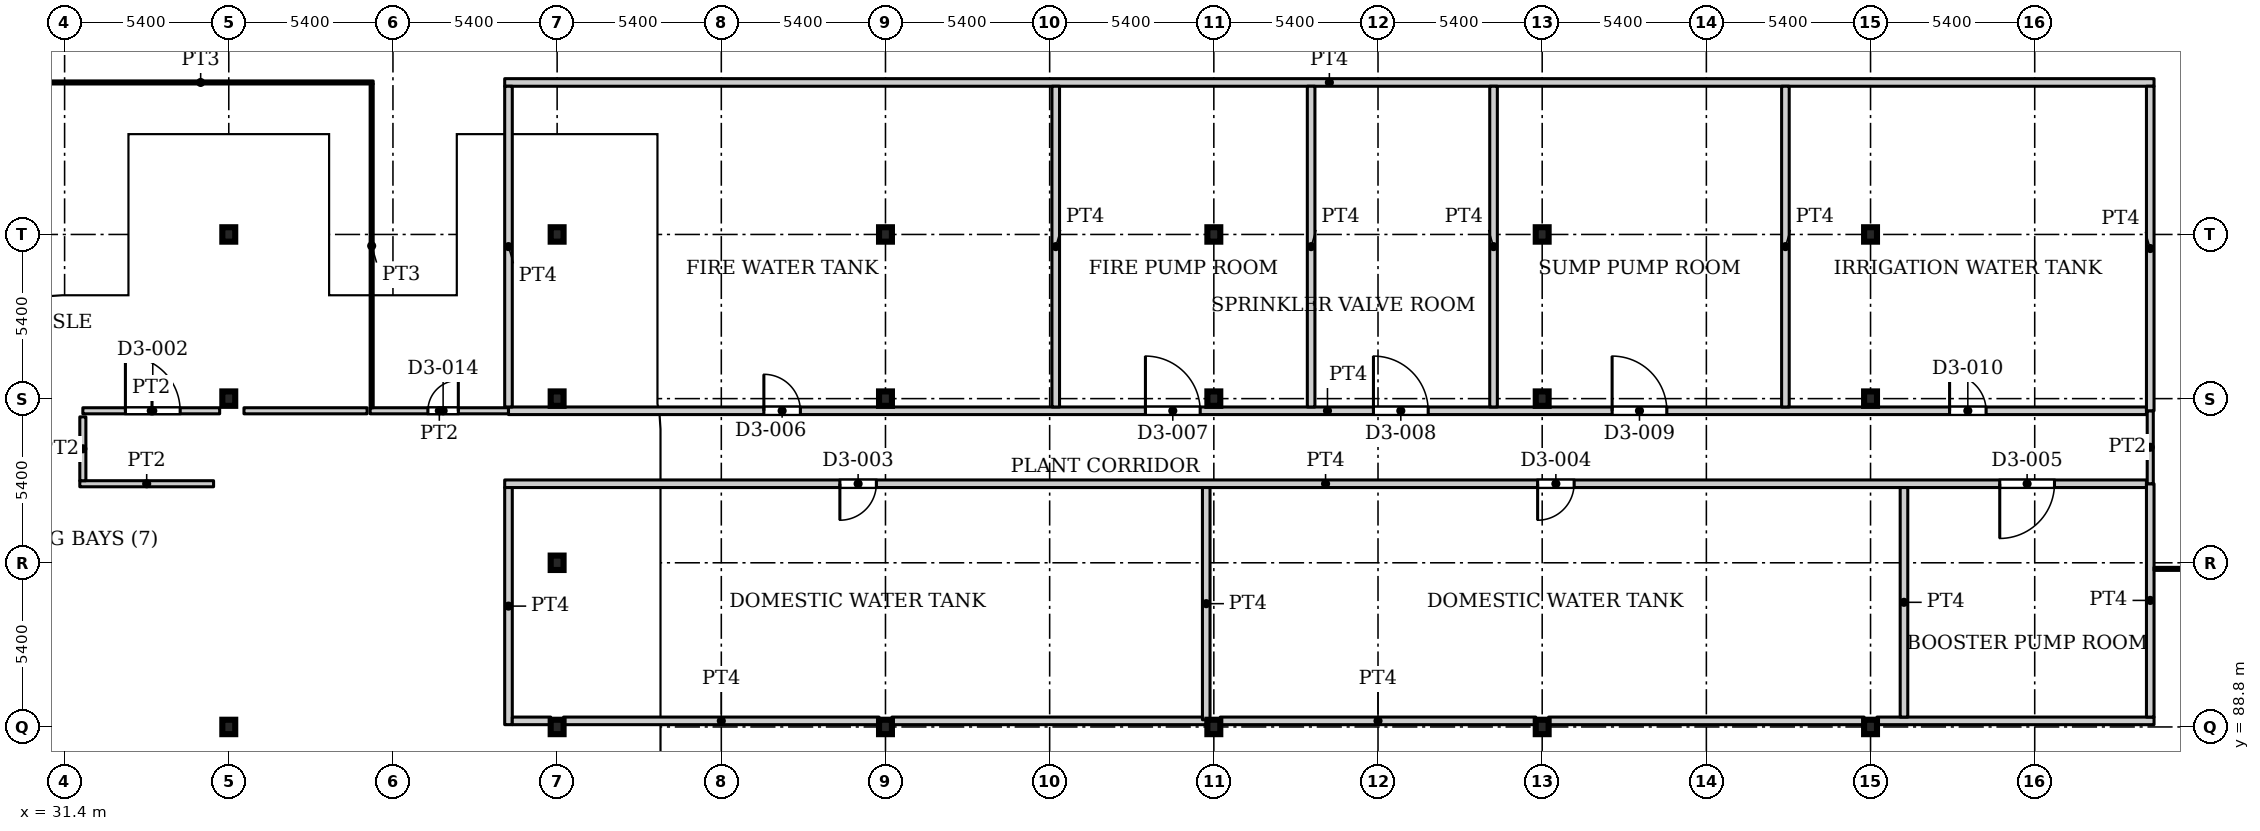
"""IFC4 building model, lengths in metres.
Left out: names, types, materials, properties, quantities, classifications, styles, units other than length and angle.
Written with IfcOpenShell. Run it as: python <this file> out.ifc"""

import sys

from ifc_helpers import new_model, si_unit, direction, frame, frame_2d, origin, origin_2d, place, context, subcontext, project, spatial, rectangle, i_section, extrude, source, transform, mapped, element, fill, save


model = new_model("IFC4")
c1 = context("Model", 3, precision=1e-05, world=origin(), true_north=direction((0.0, 1.0)))
c2 = subcontext(c1, "Body", "Model", "MODEL_VIEW")
j1 = project(units=[si_unit("LENGTHUNIT", "METRE"), si_unit("PLANEANGLEUNIT", "RADIAN")], contexts=[c1])
p1 = place(None, origin())
s1 = spatial("IfcSite", under=j1, at=p1, CompositionType="ELEMENT")
p2 = place(p1, origin())
s2 = spatial("IfcBuilding", under=s1, at=p2, CompositionType="ELEMENT")
p3 = place(p2, frame((0.0, 0.0, -15.0)))
s3 = spatial("IfcBuildingStorey", under=s2, at=p3, CompositionType="ELEMENT", Elevation=-15.0)
for number, where, z_axis, x_axis in (
    (1, (36.8, 88.8, 0.0), (0.0, 0.0, 1.0), (1.0, 0.0, 0.0)),
    (2, (47.6, 88.8, 0.0), (0.0, 0.0, 1.0), (1.0, 0.0, 0.0)),
    (3, (58.4, 88.8, 0.0), (0.0, 0.0, 1.0), (1.0, 0.0, 0.0)),
    (4, (69.2, 88.8, 0.0), (0.0, 0.0, 1.0), (1.0, 0.0, 0.0)),
    (5, (80.0, 88.8, 0.0), (0.0, 0.0, 1.0), (1.0, 0.0, 0.0)),
    (6, (90.8, 88.8, 0.0), (0.0, 0.0, 1.0), (1.0, 0.0, 0.0)),
    (7, (36.8, 99.6, 0.0), (0.0, 0.0, 1.0), (1.0, 0.0, 0.0)),
    (8, (47.6, 99.6, 0.0), (0.0, 0.0, 1.0), (1.0, 0.0, 0.0)),
    (9, (58.4, 99.6, 0.0), (0.0, 0.0, 1.0), (1.0, 0.0, 0.0)),
    (10, (69.2, 99.6, 0.0), (0.0, 0.0, 1.0), (1.0, 0.0, 0.0)),
    (11, (80.0, 99.6, 0.0), (0.0, 0.0, 1.0), (1.0, 0.0, 0.0)),
    (12, (90.8, 99.6, 0.0), (0.0, 0.0, 1.0), (1.0, 0.0, 0.0)),
    (13, (36.8, 105.0, 0.0), (0.0, 0.0, 1.0), (1.0, 0.0, 0.0)),
    (14, (47.6, 105.0, 0.0), (0.0, 0.0, 1.0), (1.0, 0.0, 0.0)),
    (15, (58.4, 105.0, 0.0), (0.0, 0.0, 1.0), (1.0, 0.0, 0.0)),
    (16, (69.2, 105.0, 0.0), (0.0, 0.0, 1.0), (1.0, 0.0, 0.0)),
    (17, (80.0, 105.0, 0.0), (0.0, 0.0, 1.0), (1.0, 0.0, 0.0)),
    (18, (90.8, 105.0, 0.0), (0.0, 0.0, 1.0), (1.0, 0.0, 0.0)),
    (19, (47.6, 94.2, 0.0), (0.0, 0.0, 1.0), (1.0, 0.0, 0.0)),
):
    element("IfcColumn", number, at=place(p3, frame(where, z_axis=z_axis, x_axis=x_axis)), inside=s3, PredefinedType="COLUMN", context=c2, shape_type="SweptSolid", body=[
        extrude(i_section(OverallWidth=0.424, OverallDepth=0.474, WebThickness=0.048, FlangeThickness=0.077, FilletRadius=0.014, at=origin_2d()), origin(), (0.0, 0.0, 1.0), 5.0),
    ])
p4 = place(p3, frame((30.2, 110.0, 0.0), z_axis=(0.0, 0.0, 1.0), x_axis=(1.0, 0.0, 0.0)))
e20 = element("IfcWall", 20, at=p4, inside=s3, PredefinedType="PARTITIONING", context=c2, shape_type="SweptSolid", body=[
    extrude(rectangle(XDim=11.35, YDim=0.1, at=frame_2d((5.675, 0.0))), origin(), (0.0, 0.0, 1.0), 4.68),
])
p5 = place(p3, frame((31.9, 96.8, 0.0), z_axis=(0.0, 0.0, 1.0), x_axis=(1.0, 0.0, 0.0)))
e21 = element("IfcWall", 21, at=p5, inside=s3, PredefinedType="PARTITIONING", context=c2, shape_type="SweptSolid", body=[
    extrude(rectangle(XDim=4.4, YDim=0.2, at=frame_2d((2.2, 0.0))), origin(), (0.0, 0.0, 1.0), 4.68),
])
p6 = place(p3, frame((32.0, 96.9, 0.0), z_axis=(0.0, 0.0, 1.0), x_axis=(0.0, 1.0, 0.0)))
e22 = element("IfcWall", 22, at=p6, inside=s3, PredefinedType="PARTITIONING", context=c2, shape_type="SweptSolid", body=[
    extrude(rectangle(XDim=2.1, YDim=0.2, at=frame_2d((1.05, 0.0))), origin(), (0.0, 0.0, 1.0), 4.68),
])
p7 = place(p3, frame((32.0, 99.2, 0.0), z_axis=(0.0, 0.0, 1.0), x_axis=(1.0, 0.0, 0.0)))
e23 = element("IfcWall", 23, at=p7, inside=s3, PredefinedType="PARTITIONING", context=c2, shape_type="SweptSolid", body=[
    extrude(rectangle(XDim=4.5, YDim=0.2, at=frame_2d((2.25, 0.0))), origin(), (0.0, 0.0, 1.0), 4.68),
])
p8 = place(p7, frame((1.4, 0.0, 0.0)))
e24 = element("IfcOpeningElement", 24, at=p8, cuts=e23, PredefinedType="OPENING", context=c2, shape_type="SweptSolid", body=[
    extrude(rectangle(XDim=1.8, YDim=2.1, at=frame_2d((0.9, 1.05))), frame((0.0, 0.11, 0.0), z_axis=(0.0, -1.0, 0.0), x_axis=(1.0, 0.0, 0.0)), (0.0, 0.0, 1.0), 0.22),
])
p9 = place(p3, frame((37.3, 99.2, 0.0), z_axis=(0.0, 0.0, 1.0), x_axis=(1.0, 0.0, 0.0)))
e25 = element("IfcWall", 25, at=p9, inside=s3, PredefinedType="PARTITIONING", context=c2, shape_type="SweptSolid", body=[
    extrude(rectangle(XDim=4.05, YDim=0.2, at=frame_2d((2.025, 0.0))), origin(), (0.0, 0.0, 1.0), 4.68),
])
p10 = place(p3, frame((41.45, 99.2, 0.0), z_axis=(0.0, 0.0, 1.0), x_axis=(1.0, 0.0, 0.0)))
e26 = element("IfcWall", 26, at=p10, inside=s3, PredefinedType="PARTITIONING", context=c2, shape_type="SweptSolid", body=[
    extrude(rectangle(XDim=4.55, YDim=0.2, at=frame_2d((2.275, 0.0))), origin(), (0.0, 0.0, 1.0), 4.68),
])
p11 = place(p10, frame((1.9, 0.0, 0.0)))
e27 = element("IfcOpeningElement", 27, at=p11, cuts=e26, PredefinedType="OPENING", context=c2, shape_type="SweptSolid", body=[
    extrude(rectangle(XDim=1.0, YDim=2.1, at=frame_2d((0.5, 1.05))), frame((0.0, 0.11, 0.0), z_axis=(0.0, -1.0, 0.0), x_axis=(1.0, 0.0, 0.0)), (0.0, 0.0, 1.0), 0.22),
])
p12 = place(p3, frame((41.5, 99.3, 0.0), z_axis=(0.0, 0.0, 1.0), x_axis=(0.0, 1.0, 0.0)))
e28 = element("IfcWall", 28, at=p12, inside=s3, PredefinedType="PARTITIONING", context=c2, shape_type="SweptSolid", body=[
    extrude(rectangle(XDim=10.65, YDim=0.1, at=frame_2d((5.325, 0.0))), origin(), (0.0, 0.0, 1.0), 4.68),
])
p13 = place(p3, frame((45.875, 96.8, 0.0), z_axis=(0.0, 0.0, 1.0), x_axis=(1.0, 0.0, 0.0)))
e29 = element("IfcWall", 29, at=p13, inside=s3, PredefinedType="PARTITIONING", context=c2, shape_type="SweptSolid", body=[
    extrude(rectangle(XDim=54.0, YDim=0.25, at=frame_2d((27.0, 0.0))), origin(), (0.0, 0.0, 1.0), 4.68),
])
p14 = place(p13, frame((11.025, 0.0, 0.0)))
e30 = element("IfcOpeningElement", 30, at=p14, cuts=e29, PredefinedType="OPENING", context=c2, shape_type="SweptSolid", body=[
    extrude(rectangle(XDim=1.2, YDim=2.1, at=frame_2d((0.6, 1.05))), frame((0.0, 0.135, 0.0), z_axis=(0.0, -1.0, 0.0), x_axis=(1.0, 0.0, 0.0)), (0.0, 0.0, 1.0), 0.27),
])
p15 = place(p13, frame((33.975, 0.0, 0.0)))
e31 = element("IfcOpeningElement", 31, at=p15, cuts=e29, PredefinedType="OPENING", context=c2, shape_type="SweptSolid", body=[
    extrude(rectangle(XDim=1.2, YDim=2.1, at=frame_2d((0.6, 1.05))), frame((0.0, 0.135, 0.0), z_axis=(0.0, -1.0, 0.0), x_axis=(1.0, 0.0, 0.0)), (0.0, 0.0, 1.0), 0.27),
])
p16 = place(p13, frame((49.175, 0.0, 0.0)))
e32 = element("IfcOpeningElement", 32, at=p16, cuts=e29, PredefinedType="OPENING", context=c2, shape_type="SweptSolid", body=[
    extrude(rectangle(XDim=1.8, YDim=2.1, at=frame_2d((0.9, 1.05))), frame((0.0, 0.135, 0.0), z_axis=(0.0, -1.0, 0.0), x_axis=(1.0, 0.0, 0.0)), (0.0, 0.0, 1.0), 0.27),
])
p17 = place(p3, frame((45.875, 110.0, 0.0), z_axis=(0.0, 0.0, 1.0), x_axis=(1.0, 0.0, 0.0)))
e33 = element("IfcWall", 33, at=p17, inside=s3, PredefinedType="PARTITIONING", context=c2, shape_type="SweptSolid", body=[
    extrude(rectangle(XDim=54.25, YDim=0.25, at=frame_2d((27.125, 0.0))), origin(), (0.0, 0.0, 1.0), 4.68),
])
p18 = place(p3, frame((46.0, 88.875, 0.0), z_axis=(0.0, 0.0, 1.0), x_axis=(0.0, 1.0, 0.0)))
e34 = element("IfcWall", 34, at=p18, inside=s3, PredefinedType="PARTITIONING", context=c2, shape_type="SweptSolid", body=[
    extrude(rectangle(XDim=7.8, YDim=0.25, at=frame_2d((3.9, 0.0))), origin(), (0.0, 0.0, 1.0), 4.68),
])
p19 = place(p3, frame((46.0, 99.2, 0.0), z_axis=(0.0, 0.0, 1.0), x_axis=(1.0, 0.0, 0.0)))
e35 = element("IfcWall", 35, at=p19, inside=s3, PredefinedType="PARTITIONING", context=c2, shape_type="SweptSolid", body=[
    extrude(rectangle(XDim=53.875, YDim=0.25, at=frame_2d((26.938, 0.0))), origin(), (0.0, 0.0, 1.0), 4.68),
])
p20 = place(p19, frame((8.4, 0.0, 0.0)))
e36 = element("IfcOpeningElement", 36, at=p20, cuts=e35, PredefinedType="OPENING", context=c2, shape_type="SweptSolid", body=[
    extrude(rectangle(XDim=1.2, YDim=2.1, at=frame_2d((0.6, 1.05))), frame((0.0, 0.135, 0.0), z_axis=(0.0, -1.0, 0.0), x_axis=(1.0, 0.0, 0.0)), (0.0, 0.0, 1.0), 0.27),
])
p21 = place(p19, frame((20.95, 0.0, 0.0)))
e37 = element("IfcOpeningElement", 37, at=p21, cuts=e35, PredefinedType="OPENING", context=c2, shape_type="SweptSolid", body=[
    extrude(rectangle(XDim=1.8, YDim=2.1, at=frame_2d((0.9, 1.05))), frame((0.0, 0.135, 0.0), z_axis=(0.0, -1.0, 0.0), x_axis=(1.0, 0.0, 0.0)), (0.0, 0.0, 1.0), 0.27),
])
p22 = place(p19, frame((28.45, 0.0, 0.0)))
e38 = element("IfcOpeningElement", 38, at=p22, cuts=e35, PredefinedType="OPENING", context=c2, shape_type="SweptSolid", body=[
    extrude(rectangle(XDim=1.8, YDim=2.1, at=frame_2d((0.9, 1.05))), frame((0.0, 0.135, 0.0), z_axis=(0.0, -1.0, 0.0), x_axis=(1.0, 0.0, 0.0)), (0.0, 0.0, 1.0), 0.27),
])
p23 = place(p19, frame((36.3, 0.0, 0.0)))
e39 = element("IfcOpeningElement", 39, at=p23, cuts=e35, PredefinedType="OPENING", context=c2, shape_type="SweptSolid", body=[
    extrude(rectangle(XDim=1.8, YDim=2.1, at=frame_2d((0.9, 1.05))), frame((0.0, 0.135, 0.0), z_axis=(0.0, -1.0, 0.0), x_axis=(1.0, 0.0, 0.0)), (0.0, 0.0, 1.0), 0.27),
])
p24 = place(p19, frame((47.4, 0.0, 0.0)))
e40 = element("IfcOpeningElement", 40, at=p24, cuts=e35, PredefinedType="OPENING", context=c2, shape_type="SweptSolid", body=[
    extrude(rectangle(XDim=1.2, YDim=2.1, at=frame_2d((0.6, 1.05))), frame((0.0, 0.135, 0.0), z_axis=(0.0, -1.0, 0.0), x_axis=(1.0, 0.0, 0.0)), (0.0, 0.0, 1.0), 0.27),
])
p25 = place(p3, frame((46.0, 99.325, 0.0), z_axis=(0.0, 0.0, 1.0), x_axis=(0.0, 1.0, 0.0)))
e41 = element("IfcWall", 41, at=p25, inside=s3, PredefinedType="PARTITIONING", context=c2, shape_type="SweptSolid", body=[
    extrude(rectangle(XDim=10.55, YDim=0.25, at=frame_2d((5.275, 0.0))), origin(), (0.0, 0.0, 1.0), 4.68),
])
p26 = place(p3, frame((46.125, 89.0, 0.0), z_axis=(0.0, 0.0, 1.0), x_axis=(1.0, 0.0, 0.0)))
e42 = element("IfcWall", 42, at=p26, inside=s3, PredefinedType="PARTITIONING", context=c2, shape_type="SweptSolid", body=[
    extrude(rectangle(XDim=1.264, YDim=0.25, at=frame_2d((0.632, 0.0))), origin(), (0.0, 0.0, 1.0), 4.68),
])
p27 = place(p3, frame((47.811, 89.0, 0.0), z_axis=(0.0, 0.0, 1.0), x_axis=(1.0, 0.0, 0.0)))
e43 = element("IfcWall", 43, at=p27, inside=s3, PredefinedType="PARTITIONING", context=c2, shape_type="SweptSolid", body=[
    extrude(rectangle(XDim=10.378, YDim=0.25, at=frame_2d((5.189, 0.0))), origin(), (0.0, 0.0, 1.0), 4.68),
])
p28 = place(p3, frame((58.611, 89.0, 0.0), z_axis=(0.0, 0.0, 1.0), x_axis=(1.0, 0.0, 0.0)))
e44 = element("IfcWall", 44, at=p28, inside=s3, PredefinedType="PARTITIONING", context=c2, shape_type="SweptSolid", body=[
    extrude(rectangle(XDim=10.339, YDim=0.25, at=frame_2d((5.169, 0.0))), origin(), (0.0, 0.0, 1.0), 4.68),
])
p29 = place(p3, frame((64.0, 99.325, 0.0), z_axis=(0.0, 0.0, 1.0), x_axis=(0.0, 1.0, 0.0)))
e45 = element("IfcWall", 45, at=p29, inside=s3, PredefinedType="PARTITIONING", context=c2, shape_type="SweptSolid", body=[
    extrude(rectangle(XDim=10.55, YDim=0.25, at=frame_2d((5.275, 0.0))), origin(), (0.0, 0.0, 1.0), 4.68),
])
p30 = place(p3, frame((68.95, 89.036, 0.0), z_axis=(0.0, 0.0, 1.0), x_axis=(0.0, 1.0, 0.0)))
e46 = element("IfcWall", 46, at=p30, inside=s3, PredefinedType="PARTITIONING", context=c2, shape_type="SweptSolid", body=[
    extrude(rectangle(XDim=7.639, YDim=0.25, at=frame_2d((3.82, 0.0))), origin(), (0.0, 0.0, 1.0), 4.68),
])
p31 = place(p3, frame((69.411, 89.0, 0.0), z_axis=(0.0, 0.0, 1.0), x_axis=(1.0, 0.0, 0.0)))
e47 = element("IfcWall", 47, at=p31, inside=s3, PredefinedType="PARTITIONING", context=c2, shape_type="SweptSolid", body=[
    extrude(rectangle(XDim=10.378, YDim=0.25, at=frame_2d((5.189, 0.0))), origin(), (0.0, 0.0, 1.0), 4.68),
])
for number, where, z_axis, x_axis in (
    (48, (72.4, 99.325, 0.0), (0.0, 0.0, 1.0), (0.0, 1.0, 0.0)),
    (49, (78.4, 99.325, 0.0), (0.0, 0.0, 1.0), (0.0, 1.0, 0.0)),
):
    element("IfcWall", number, at=place(p3, frame(where, z_axis=z_axis, x_axis=x_axis)), inside=s3, PredefinedType="PARTITIONING", context=c2, shape_type="SweptSolid", body=[
        extrude(rectangle(XDim=10.55, YDim=0.25, at=frame_2d((5.275, 0.0))), origin(), (0.0, 0.0, 1.0), 4.68),
    ])
p32 = place(p3, frame((80.211, 89.0, 0.0), z_axis=(0.0, 0.0, 1.0), x_axis=(1.0, 0.0, 0.0)))
e50 = element("IfcWall", 50, at=p32, inside=s3, PredefinedType="PARTITIONING", context=c2, shape_type="SweptSolid", body=[
    extrude(rectangle(XDim=10.378, YDim=0.25, at=frame_2d((5.189, 0.0))), origin(), (0.0, 0.0, 1.0), 4.68),
])
p33 = place(p3, frame((88.0, 99.325, 0.0), z_axis=(0.0, 0.0, 1.0), x_axis=(0.0, 1.0, 0.0)))
e51 = element("IfcWall", 51, at=p33, inside=s3, PredefinedType="PARTITIONING", context=c2, shape_type="SweptSolid", body=[
    extrude(rectangle(XDim=10.55, YDim=0.25, at=frame_2d((5.275, 0.0))), origin(), (0.0, 0.0, 1.0), 4.68),
])
p34 = place(p3, frame((91.011, 89.0, 0.0), z_axis=(0.0, 0.0, 1.0), x_axis=(1.0, 0.0, 0.0)))
e52 = element("IfcWall", 52, at=p34, inside=s3, PredefinedType="PARTITIONING", context=c2, shape_type="SweptSolid", body=[
    extrude(rectangle(XDim=9.114, YDim=0.25, at=frame_2d((4.557, 0.0))), origin(), (0.0, 0.0, 1.0), 4.68),
])
p35 = place(p3, frame((91.9, 89.125, 0.0), z_axis=(0.0, 0.0, 1.0), x_axis=(0.0, 1.0, 0.0)))
e53 = element("IfcWall", 53, at=p35, inside=s3, PredefinedType="PARTITIONING", context=c2, shape_type="SweptSolid", body=[
    extrude(rectangle(XDim=7.55, YDim=0.25, at=frame_2d((3.775, 0.0))), origin(), (0.0, 0.0, 1.0), 4.68),
])
p36 = place(p3, frame((100.0, 89.125, 0.0), z_axis=(0.0, 0.0, 1.0), x_axis=(0.0, 1.0, 0.0)))
e54 = element("IfcWall", 54, at=p36, inside=s3, PredefinedType="PARTITIONING", context=c2, shape_type="SweptSolid", body=[
    extrude(rectangle(XDim=7.675, YDim=0.25, at=frame_2d((3.837, 0.0))), origin(), (0.0, 0.0, 1.0), 4.68),
])
p37 = place(p3, frame((100.0, 96.8, 0.0), z_axis=(0.0, 0.0, 1.0), x_axis=(0.0, 1.0, 0.0)))
e55 = element("IfcWall", 55, at=p37, inside=s3, PredefinedType="PARTITIONING", context=c2, shape_type="SweptSolid", body=[
    extrude(rectangle(XDim=2.4, YDim=0.2, at=frame_2d((1.2, 0.0))), origin(), (0.0, 0.0, 1.0), 4.68),
])
p38 = place(p3, frame((100.0, 99.2, 0.0), z_axis=(0.0, 0.0, 1.0), x_axis=(0.0, 1.0, 0.0)))
e56 = element("IfcWall", 56, at=p38, inside=s3, PredefinedType="PARTITIONING", context=c2, shape_type="SweptSolid", body=[
    extrude(rectangle(XDim=10.675, YDim=0.25, at=frame_2d((5.337, 0.0))), origin(), (0.0, 0.0, 1.0), 4.68),
])
p39 = place(p3, frame((100.125, 94.0, 0.0), z_axis=(0.0, 0.0, 1.0), x_axis=(1.0, 0.0, 0.0)))
e57 = element("IfcWall", 57, at=p39, inside=s3, PredefinedType="PARTITIONING", context=c2, shape_type="SweptSolid", body=[
    extrude(rectangle(XDim=3.825, YDim=0.1, at=frame_2d((1.913, 0.0))), origin(), (0.0, 0.0, 1.0), 4.68),
])
m1 = source(origin(), c2, "Body", "SweptSolid", [
    extrude(rectangle(XDim=1.8, YDim=2.1, at=frame_2d((0.9, 1.05))), frame((0.0, 0.025, 0.0), z_axis=(0.0, -1.0, 0.0), x_axis=(1.0, 0.0, 0.0)), (0.0, 0.0, 1.0), 0.05),
])
p40 = place(p8, origin())
e58 = element("IfcDoor", 58, at=p40, inside=s3, OperationType="DOUBLE_DOOR_SINGLE_SWING", PredefinedType="DOOR", context=c2, shape_type="MappedRepresentation", body=[
    mapped(m1, transform((0.0, 0.0, 0.0), x_axis=(1.0, 0.0, 0.0), y_axis=(0.0, 1.0, 0.0), z_axis=(0.0, 0.0, 1.0), scale=1.0)),
])
fill(e24, e58)
m2 = source(origin(), c2, "Body", "SweptSolid", [
    extrude(rectangle(XDim=1.2, YDim=2.1, at=frame_2d((0.6, 1.05))), frame((0.0, 0.025, 0.0), z_axis=(0.0, -1.0, 0.0), x_axis=(1.0, 0.0, 0.0)), (0.0, 0.0, 1.0), 0.05),
])
p41 = place(p14, origin())
e59 = element("IfcDoor", 59, at=p41, inside=s3, OperationType="SINGLE_SWING_RIGHT", PredefinedType="DOOR", context=c2, shape_type="MappedRepresentation", body=[
    mapped(m2, transform((0.0, 0.0, 0.0), x_axis=(1.0, 0.0, 0.0), y_axis=(0.0, 1.0, 0.0), z_axis=(0.0, 0.0, 1.0), scale=1.0)),
])
fill(e30, e59)
p42 = place(p15, origin())
e60 = element("IfcDoor", 60, at=p42, inside=s3, OperationType="SINGLE_SWING_RIGHT", PredefinedType="DOOR", context=c2, shape_type="MappedRepresentation", body=[
    mapped(m2, transform((0.0, 0.0, 0.0), x_axis=(1.0, 0.0, 0.0), y_axis=(0.0, 1.0, 0.0), z_axis=(0.0, 0.0, 1.0), scale=1.0)),
])
fill(e31, e60)
m3 = source(origin(), c2, "Body", "SweptSolid", [
    extrude(rectangle(XDim=1.8, YDim=2.1, at=frame_2d((0.9, 1.05))), frame((0.0, 0.025, 0.0), z_axis=(0.0, -1.0, 0.0), x_axis=(1.0, 0.0, 0.0)), (0.0, 0.0, 1.0), 0.05),
])
p43 = place(p16, origin())
e61 = element("IfcDoor", 61, at=p43, inside=s3, OperationType="DOUBLE_DOOR_SINGLE_SWING", PredefinedType="DOOR", context=c2, shape_type="MappedRepresentation", body=[
    mapped(m3, transform((0.0, 0.0, 0.0), x_axis=(1.0, 0.0, 0.0), y_axis=(0.0, 1.0, 0.0), z_axis=(0.0, 0.0, 1.0), scale=1.0)),
])
fill(e32, e61)
p44 = place(p20, origin())
e62 = element("IfcDoor", 62, at=p44, inside=s3, OperationType="SINGLE_SWING_LEFT", PredefinedType="DOOR", context=c2, shape_type="MappedRepresentation", body=[
    mapped(m2, transform((0.0, 0.0, 0.0), x_axis=(1.0, 0.0, 0.0), y_axis=(0.0, 1.0, 0.0), z_axis=(0.0, 0.0, 1.0), scale=1.0)),
])
fill(e36, e62)
p45 = place(p21, origin())
e63 = element("IfcDoor", 63, at=p45, inside=s3, OperationType="DOUBLE_DOOR_SINGLE_SWING", PredefinedType="DOOR", context=c2, shape_type="MappedRepresentation", body=[
    mapped(m3, transform((0.0, 0.0, 0.0), x_axis=(1.0, 0.0, 0.0), y_axis=(0.0, 1.0, 0.0), z_axis=(0.0, 0.0, 1.0), scale=1.0)),
])
fill(e37, e63)
p46 = place(p22, origin())
e64 = element("IfcDoor", 64, at=p46, inside=s3, OperationType="DOUBLE_DOOR_SINGLE_SWING", PredefinedType="DOOR", context=c2, shape_type="MappedRepresentation", body=[
    mapped(m3, transform((0.0, 0.0, 0.0), x_axis=(1.0, 0.0, 0.0), y_axis=(0.0, 1.0, 0.0), z_axis=(0.0, 0.0, 1.0), scale=1.0)),
])
fill(e38, e64)
p47 = place(p23, origin())
e65 = element("IfcDoor", 65, at=p47, inside=s3, OperationType="DOUBLE_DOOR_SINGLE_SWING", PredefinedType="DOOR", context=c2, shape_type="MappedRepresentation", body=[
    mapped(m3, transform((0.0, 0.0, 0.0), x_axis=(1.0, 0.0, 0.0), y_axis=(0.0, 1.0, 0.0), z_axis=(0.0, 0.0, 1.0), scale=1.0)),
])
fill(e39, e65)
p48 = place(p24, origin())
e66 = element("IfcDoor", 66, at=p48, inside=s3, OperationType="SINGLE_SWING_LEFT", PredefinedType="DOOR", context=c2, shape_type="MappedRepresentation", body=[
    mapped(m2, transform((0.0, 0.0, 0.0), x_axis=(1.0, 0.0, 0.0), y_axis=(0.0, 1.0, 0.0), z_axis=(0.0, 0.0, 1.0), scale=1.0)),
])
fill(e40, e66)
m4 = source(origin(), c2, "Body", "SweptSolid", [
    extrude(rectangle(XDim=1.0, YDim=2.1, at=frame_2d((0.5, 1.05))), frame((0.0, 0.025, 0.0), z_axis=(0.0, -1.0, 0.0), x_axis=(1.0, 0.0, 0.0)), (0.0, 0.0, 1.0), 0.05),
])
p49 = place(p11, origin())
e67 = element("IfcDoor", 67, at=p49, inside=s3, OperationType="SINGLE_SWING_LEFT", PredefinedType="DOOR", context=c2, shape_type="MappedRepresentation", body=[
    mapped(m4, transform((0.0, 0.0, 0.0), x_axis=(1.0, 0.0, 0.0), y_axis=(0.0, 1.0, 0.0), z_axis=(0.0, 0.0, 1.0), scale=1.0)),
])
fill(e27, e67)
save(model, sys.argv[1])
